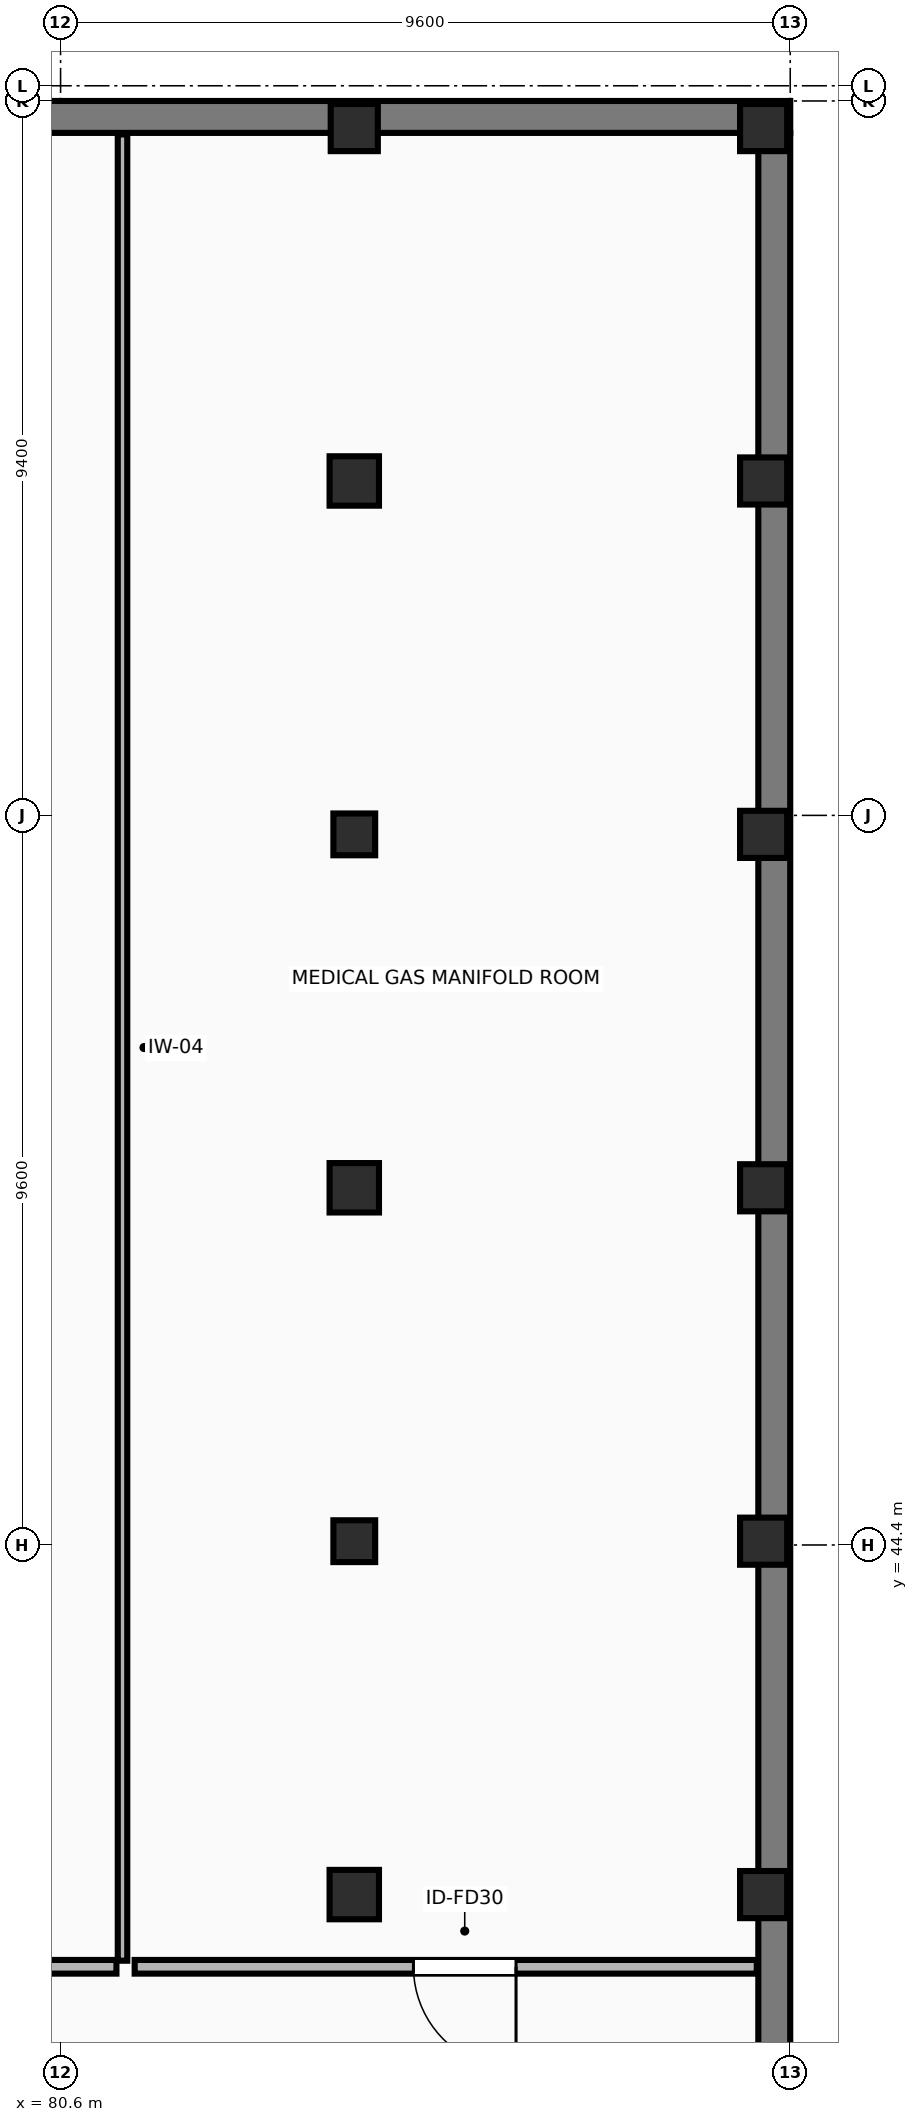
"""IFC4 building model, lengths in metres.
Left out: names, types, materials, properties, quantities, classifications, styles, units other than length and angle.
Written with IfcOpenShell. Run it as: python <this file> out.ifc"""

import sys

from ifc_helpers import new_model, si_unit, direction, frame, frame_2d, origin, origin_2d, place, context, subcontext, project, spatial, rectangle, circle, extrude, element, fill, save


model = new_model("IFC4")
c1 = context("Model", 3, precision=1e-05, world=origin(), true_north=direction((0.0, 1.0)))
c2 = subcontext(c1, "Body", "Model", "MODEL_VIEW")
j1 = project(units=[si_unit("LENGTHUNIT", "METRE"), si_unit("PLANEANGLEUNIT", "RADIAN")], contexts=[c1])
p1 = place(None, origin())
s1 = spatial("IfcSite", under=j1, at=p1, CompositionType="ELEMENT")
p2 = place(p1, origin())
s2 = spatial("IfcBuilding", under=s1, at=p2, CompositionType="ELEMENT")
p3 = place(p2, frame((0.0, 0.0, -4.5)))
s3 = spatial("IfcBuildingStorey", under=s2, at=p3, CompositionType="ELEMENT", Elevation=-4.5)
p4 = place(p3, frame((84.464, 39.8, -0.55), z_axis=(0.0, 0.0, 1.0), x_axis=(1.0, 0.0, 0.0)))
e1 = element("IfcColumn", 1, at=p4, inside=s3, PredefinedType="COLUMN", context=c2, shape_type="SweptSolid", body=[
    extrude(rectangle(XDim=0.65, YDim=0.65, at=origin_2d()), origin(), (0.0, 0.0, 1.0), 5.05),
])
p5 = place(p3, frame((84.464, 44.45, -0.55), z_axis=(0.0, 0.0, 1.0), x_axis=(1.0, 0.0, 0.0)))
e2 = element("IfcColumn", 2, at=p5, inside=s3, PredefinedType="COLUMN", context=c2, shape_type="SweptSolid", body=[
    extrude(rectangle(XDim=0.55, YDim=0.55, at=origin_2d()), origin(), (0.0, 0.0, 1.0), 5.05),
])
p6 = place(p3, frame((84.464, 49.1, -0.55), z_axis=(0.0, 0.0, 1.0), x_axis=(1.0, 0.0, 0.0)))
e3 = element("IfcColumn", 3, at=p6, inside=s3, PredefinedType="COLUMN", context=c2, shape_type="SweptSolid", body=[
    extrude(rectangle(XDim=0.65, YDim=0.65, at=origin_2d()), origin(), (0.0, 0.0, 1.0), 5.05),
])
p7 = place(p3, frame((84.464, 53.75, -0.55), z_axis=(0.0, 0.0, 1.0), x_axis=(1.0, 0.0, 0.0)))
e4 = element("IfcColumn", 4, at=p7, inside=s3, PredefinedType="COLUMN", context=c2, shape_type="SweptSolid", body=[
    extrude(rectangle(XDim=0.55, YDim=0.55, at=origin_2d()), origin(), (0.0, 0.0, 1.0), 5.05),
])
p8 = place(p3, frame((84.464, 58.4, -0.55), z_axis=(0.0, 0.0, 1.0), x_axis=(1.0, 0.0, 0.0)))
e5 = element("IfcColumn", 5, at=p8, inside=s3, PredefinedType="COLUMN", context=c2, shape_type="SweptSolid", body=[
    extrude(rectangle(XDim=0.65, YDim=0.65, at=origin_2d()), origin(), (0.0, 0.0, 1.0), 5.05),
])
for number, where, z_axis, x_axis in (
    (6, (84.464, 63.05, -0.55), (0.0, 0.0, 1.0), (1.0, 0.0, 0.0)),
    (7, (89.85, 39.8, -0.55), (0.0, 0.0, 1.0), (1.0, 0.0, 0.0)),
    (8, (89.85, 44.45, -0.55), (0.0, 0.0, 1.0), (1.0, 0.0, 0.0)),
    (9, (89.85, 49.1, -0.55), (0.0, 0.0, 1.0), (1.0, 0.0, 0.0)),
    (10, (89.85, 53.75, -0.55), (0.0, 0.0, 1.0), (1.0, 0.0, 0.0)),
    (11, (89.85, 58.4, -0.55), (0.0, 0.0, 1.0), (1.0, 0.0, 0.0)),
    (12, (89.85, 63.05, -0.55), (0.0, 0.0, 1.0), (1.0, 0.0, 0.0)),
):
    element("IfcColumn", number, at=place(p3, frame(where, z_axis=z_axis, x_axis=x_axis)), inside=s3, PredefinedType="COLUMN", context=c2, shape_type="SweptSolid", body=[
        extrude(circle(Radius=0.31, at=origin_2d()), origin(), (0.0, 0.0, 1.0), 5.05),
    ])
p9 = place(p3, frame((90.2, 63.19, 0.0), z_axis=(0.0, 0.0, 1.0), x_axis=(-1.0, 0.0, 0.0)))
e13 = element("IfcWall", 13, at=p9, inside=s3, PredefinedType="SHEAR", context=c2, shape_type="SweptSolid", body=[
    extrude(rectangle(XDim=38.4, YDim=0.42, at=frame_2d((19.2, 0.0))), origin(), (0.0, 0.0, 1.0), 4.18),
])
p10 = place(p3, frame((89.99, 62.98, 0.0), z_axis=(0.0, 0.0, 1.0), x_axis=(0.0, -1.0, 0.0)))
e14 = element("IfcWall", 14, at=p10, inside=s3, PredefinedType="SHEAR", context=c2, shape_type="SweptSolid", body=[
    extrude(rectangle(XDim=27.76, YDim=0.42, at=frame_2d((13.88, 0.0))), origin(), (0.0, 0.0, 1.0), 4.18),
])
p11 = place(p3, frame((81.415, 62.96, 0.0), z_axis=(0.0, 0.0, 1.0), x_axis=(0.0, -1.0, 0.0)))
e15 = element("IfcWall", 15, at=p11, inside=s3, PredefinedType="PARTITIONING", context=c2, shape_type="SweptSolid", body=[
    extrude(rectangle(XDim=24.03, YDim=0.125, at=frame_2d((12.015, 0.0))), origin(), (0.0, 0.0, 1.0), 3.848),
])
p12 = place(p3, frame((81.335, 38.85, 0.0), z_axis=(0.0, 0.0, 1.0), x_axis=(-1.0, 0.0, 0.0)))
e16 = element("IfcWall", 16, at=p12, inside=s3, PredefinedType="PARTITIONING", context=c2, shape_type="SweptSolid", body=[
    extrude(rectangle(XDim=8.145, YDim=0.18, at=frame_2d((4.073, 0.0))), origin(), (0.0, 0.0, 1.0), 4.18),
])
p13 = place(p12, frame((3.397, 0.0, 0.0)))
e17 = element("IfcOpeningElement", 17, at=p13, cuts=e16, PredefinedType="OPENING", context=c2, shape_type="SweptSolid", body=[
    extrude(rectangle(XDim=1.35, YDim=2.2, at=frame_2d((0.675, 1.1))), frame((0.0, 0.1, 0.0), z_axis=(0.0, -1.0, 0.0), x_axis=(1.0, 0.0, 0.0)), (0.0, 0.0, 1.0), 0.2),
])
p14 = place(p3, frame((89.76, 38.85, 0.0), z_axis=(0.0, 0.0, 1.0), x_axis=(-1.0, 0.0, 0.0)))
e18 = element("IfcWall", 18, at=p14, inside=s3, PredefinedType="PARTITIONING", context=c2, shape_type="SweptSolid", body=[
    extrude(rectangle(XDim=8.185, YDim=0.18, at=frame_2d((4.093, 0.0))), origin(), (0.0, 0.0, 1.0), 4.18),
])
p15 = place(p14, frame((3.167, 0.0, 0.0)))
e19 = element("IfcOpeningElement", 19, at=p15, cuts=e18, PredefinedType="OPENING", context=c2, shape_type="SweptSolid", body=[
    extrude(rectangle(XDim=1.35, YDim=2.2, at=frame_2d((0.675, 1.1))), frame((0.0, 0.1, 0.0), z_axis=(0.0, -1.0, 0.0), x_axis=(1.0, 0.0, 0.0)), (0.0, 0.0, 1.0), 0.2),
])
p16 = place(p15, origin())
e20 = element("IfcDoor", 20, at=p16, inside=s3, OperationType="SINGLE_SWING_LEFT", PredefinedType="DOOR", context=c2, shape_type="SweptSolid", body=[
    extrude(rectangle(XDim=1.35, YDim=2.2, at=frame_2d((0.675, 1.1))), frame((0.0, 0.025, 0.0), z_axis=(0.0, -1.0, 0.0), x_axis=(1.0, 0.0, 0.0)), (0.0, 0.0, 1.0), 0.05),
])
fill(e19, e20)
save(model, sys.argv[1])
